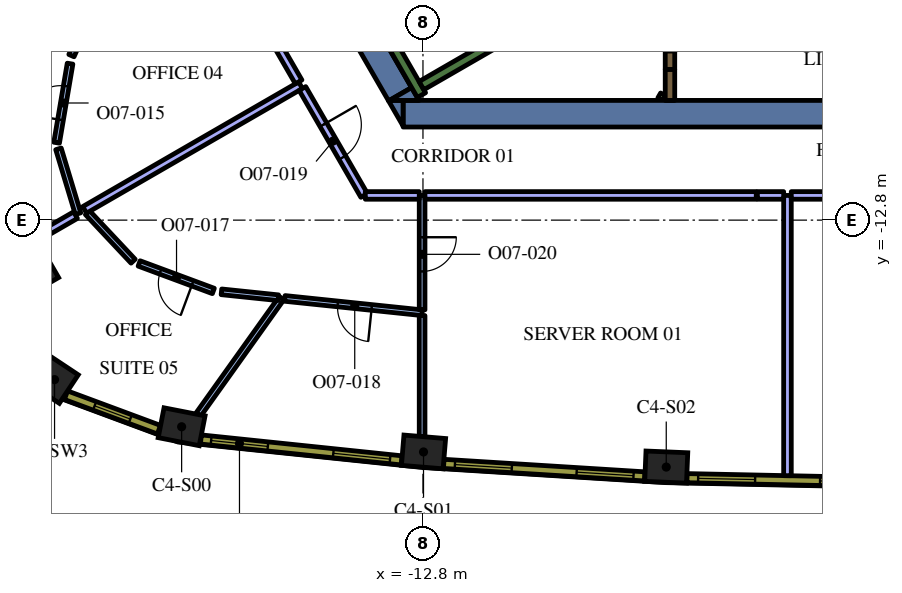
"""IFC4 building model, lengths in metres.
Left out: names, types, materials, properties, quantities, classifications, styles, units other than length and angle.
Written with IfcOpenShell. Run it as: python <this file> out.ifc"""

import sys

from ifc_helpers import new_model, si_unit, direction, frame, frame_2d, origin, origin_2d, place, context, subcontext, project, spatial, polyline, rectangle, outline, extrude, element, fill, save


model = new_model("IFC4")
c1 = context("Model", 3, precision=1e-05, world=origin(), true_north=direction((0.0, 1.0)))
c2 = subcontext(c1, "Body", "Model", "MODEL_VIEW")
j1 = project(units=[si_unit("LENGTHUNIT", "METRE"), si_unit("PLANEANGLEUNIT", "RADIAN")], contexts=[c1])
p1 = place(None, origin())
s1 = spatial("IfcSite", under=j1, at=p1, CompositionType="ELEMENT")
p2 = place(p1, origin())
s2 = spatial("IfcBuilding", under=s1, at=p2, CompositionType="ELEMENT")
p3 = place(p2, frame((0.0, 0.0, 222.6)))
s3 = spatial("IfcBuildingStorey", under=s2, at=p3, CompositionType="ELEMENT", Elevation=222.6)
p4 = place(p3, frame((-24.027, -13.872, 0.0), z_axis=(0.0, 0.0, 1.0), x_axis=(-0.866025403784, -0.5, 0.0)))
e1 = element("IfcColumn", 1, at=p4, inside=s3, PredefinedType="COLUMN", context=c2, shape_type="SweptSolid", body=[
    extrude(rectangle(XDim=2.4, YDim=2.4, at=origin_2d()), origin(), (0.0, 0.0, 1.0), 4.2),
])
for number, where, z_axis, x_axis in (
    (2, (-19.15, -18.237, 0.0), (0.0, 0.0, 1.0), (0.981, -0.192, 0.0)),
    (3, (-12.785, -18.9, 0.0), (0.0, 0.0, 1.0), (0.997, -0.083, 0.0)),
    (4, (-6.398, -19.298, 0.0), (0.0, 0.0, 1.0), (0.999, -0.041, 0.0)),
):
    element("IfcColumn", number, at=place(p3, frame(where, z_axis=z_axis, x_axis=x_axis)), inside=s3, PredefinedType="COLUMN", context=c2, shape_type="SweptSolid", body=[
        extrude(rectangle(XDim=1.1, YDim=0.8, at=origin_2d()), origin(), (0.0, 0.0, 1.0), 4.2),
    ])
p5 = place(p3, frame((-22.494, -16.997, 0.0), z_axis=(0.0, 0.0, 1.0), x_axis=(0.833238868178, -0.552913183563, 0.0)))
e5 = element("IfcColumn", 5, at=p5, inside=s3, PredefinedType="COLUMN", context=c2, shape_type="SweptSolid", body=[
    extrude(rectangle(XDim=0.9, YDim=0.9, at=origin_2d()), origin(), (0.0, 0.0, 1.0), 4.2),
])
p6 = place(p3, frame((8.904, -10.0, 0.0), z_axis=(0.0, 0.0, 1.0), x_axis=(-1.0, 0.0, 0.0)))
e6 = element("IfcWall", 6, at=p6, inside=s3, PredefinedType="SOLIDWALL", context=c2, shape_type="SweptSolid", body=[
    extrude(rectangle(XDim=22.226, YDim=0.7, at=frame_2d((11.113, 0.0))), origin(), (0.0, 0.0, 1.0), 4.2),
])
p7 = place(p3, origin())
e7 = element("IfcWall", 7, at=p7, inside=s3, PredefinedType="SOLIDWALL", context=c2, shape_type="SweptSolid", body=[
    extrude(outline(polyline([(-13.712, -9.65), (-13.324, -9.65), (-13.324, -10.322), (-13.712, -9.65)])), origin(), (0.0, 0.0, 1.0), 4.2),
])
p8 = place(p3, frame((-13.402, -9.487, 0.0), z_axis=(0.0, 0.0, 1.0), x_axis=(-0.500020498207, 0.866013568815, 0.0)))
e8 = element("IfcWall", 8, at=p8, inside=s3, PredefinedType="SOLIDWALL", context=c2, shape_type="SweptSolid", body=[
    extrude(rectangle(XDim=3.829, YDim=0.7, at=frame_2d((1.915, 0.0))), origin(), (0.0, 0.0, 1.0), 4.2),
])
e9 = element("IfcWall", 9, at=p7, inside=s3, PredefinedType="SOLIDWALL", context=c2, shape_type="SweptSolid", body=[
    extrude(outline(polyline([(-12.904, -9.65), (-13.68, -9.65), (-13.098, -9.314), (-12.904, -9.65)])), origin(), (0.0, 0.0, 1.0), 4.2),
])
p9 = place(p3, frame((-12.84, -9.511, 0.0), z_axis=(0.0, 0.0, 1.0), x_axis=(-0.499997733992, 0.866026712061, 0.0)))
e10 = element("IfcWall", 10, at=p9, inside=s3, PredefinedType="SOLIDWALL", context=c2, shape_type="SweptSolid", body=[
    extrude(rectangle(XDim=3.634, YDim=0.25, at=frame_2d((1.817, 0.0))), origin(), (0.0, 0.0, 1.0), 4.2),
])
p10 = place(p3, frame((-12.84, -9.261, 0.0), z_axis=(0.0, 0.0, 1.0), x_axis=(0.866016039709, 0.500016218704, 0.0)))
e11 = element("IfcWall", 11, at=p10, inside=s3, PredefinedType="SOLIDWALL", context=c2, shape_type="SweptSolid", body=[
    extrude(rectangle(XDim=7.05, YDim=0.25, at=frame_2d((3.525, 0.0))), origin(), (0.0, 0.0, 1.0), 4.2),
])
p11 = place(p3, frame((-6.3, -9.65, 0.0), z_axis=(0.0, 0.0, 1.0), x_axis=(0.0, 1.0, 0.0)))
e12 = element("IfcWall", 12, at=p11, inside=s3, PredefinedType="SOLIDWALL", context=c2, shape_type="SweptSolid", body=[
    extrude(rectangle(XDim=0.816, YDim=0.25, at=frame_2d((0.408, 0.0))), origin(), (0.0, 0.0, 1.0), 4.2),
])
p12 = place(p3, frame((-6.553, -9.618, 0.0), z_axis=(0.0, 0.0, 1.0), x_axis=(0.499915430684, 0.866074224396, 0.0)))
e13 = element("IfcWall", 13, at=p12, inside=s3, PredefinedType="PARTITIONING", context=c2, shape_type="SweptSolid", body=[
    extrude(rectangle(XDim=0.146, YDim=0.15, at=frame_2d((0.073, 0.0))), origin(), (0.0, 0.0, 1.0), 3.45),
])
p13 = place(p3, frame((-6.3, -7.034, 0.0), z_axis=(0.0, 0.0, 1.0), x_axis=(0.0, -1.0, 0.0)))
e14 = element("IfcWall", 14, at=p13, inside=s3, PredefinedType="SOLIDWALL", context=c2, shape_type="SweptSolid", body=[
    extrude(rectangle(XDim=1.8, YDim=0.25, at=frame_2d((0.9, 0.0))), origin(), (0.0, 0.0, 1.0), 4.2),
])
p14 = place(p13, frame((0.45, 0.0, 0.0)))
e15 = element("IfcOpeningElement", 15, at=p14, cuts=e14, PredefinedType="OPENING", context=c2, shape_type="SweptSolid", body=[
    extrude(rectangle(XDim=0.9, YDim=2.1, at=frame_2d((0.45, 1.05))), frame((0.0, 0.135, 0.0), z_axis=(0.0, -1.0, 0.0), x_axis=(1.0, 0.0, 0.0)), (0.0, 0.0, 1.0), 0.27),
])
p15 = place(p3, frame((-3.208, -19.524, 0.0), z_axis=(0.0, 0.0, 1.0), x_axis=(0.0, 1.0, 0.0)))
e16 = element("IfcWall", 16, at=p15, inside=s3, PredefinedType="PARTITIONING", context=c2, shape_type="SweptSolid", body=[
    extrude(rectangle(XDim=7.374, YDim=0.2, at=frame_2d((3.687, 0.0))), origin(), (0.0, 0.0, 1.0), 3.45),
])
p16 = place(p3, frame((-3.108, -12.15, 0.0), z_axis=(0.0, 0.0, 1.0), x_axis=(1.0, 0.0, 0.0)))
e17 = element("IfcWall", 17, at=p16, inside=s3, PredefinedType="PARTITIONING", context=c2, shape_type="SweptSolid", body=[
    extrude(rectangle(XDim=7.108, YDim=0.2, at=frame_2d((3.554, 0.0))), origin(), (0.0, 0.0, 1.0), 3.45),
])
p17 = place(p16, frame((3.1, 0.0, 0.0)))
e18 = element("IfcOpeningElement", 18, at=p17, cuts=e17, PredefinedType="OPENING", context=c2, shape_type="SweptSolid", body=[
    extrude(rectangle(XDim=1.0, YDim=2.1, at=frame_2d((0.5, 1.05))), frame((0.0, 0.11, 0.0), z_axis=(0.0, -1.0, 0.0), x_axis=(1.0, 0.0, 0.0)), (0.0, 0.0, 1.0), 0.22),
])
p18 = place(p3, frame((-21.386, -6.983, 0.0), z_axis=(0.0, 0.0, 1.0), x_axis=(-0.407597309494, -0.91316177827, 0.0)))
e19 = element("IfcWall", 19, at=p18, inside=s3, PredefinedType="PARTITIONING", context=c2, shape_type="SweptSolid", body=[
    extrude(rectangle(XDim=1.63, YDim=0.15, at=frame_2d((0.815, 0.0))), origin(), (0.0, 0.0, 1.0), 3.45),
])
p19 = place(p3, frame((-22.44, -10.763, 0.0), z_axis=(0.0, 0.0, 1.0), x_axis=(0.167682096872, 0.985841120257, 0.0)))
e20 = element("IfcWall", 20, at=p19, inside=s3, PredefinedType="PARTITIONING", context=c2, shape_type="SweptSolid", body=[
    extrude(rectangle(XDim=2.11, YDim=0.15, at=frame_2d((1.055, 0.0))), origin(), (0.0, 0.0, 1.0), 3.45),
])
p20 = place(p19, frame((0.61, 0.0, 0.0)))
e21 = element("IfcOpeningElement", 21, at=p20, cuts=e20, PredefinedType="OPENING", context=c2, shape_type="SweptSolid", body=[
    extrude(rectangle(XDim=0.9, YDim=2.1, at=frame_2d((0.45, 1.05))), frame((0.0, 0.085, 0.0), z_axis=(0.0, -1.0, 0.0), x_axis=(1.0, 0.0, 0.0)), (0.0, 0.0, 1.0), 0.17),
])
p21 = place(p3, frame((-22.391, -10.924, 0.0), z_axis=(0.0, 0.0, 1.0), x_axis=(0.288642134652, -0.957437056993, 0.0)))
e22 = element("IfcWall", 22, at=p21, inside=s3, PredefinedType="PARTITIONING", context=c2, shape_type="SweptSolid", body=[
    extrude(rectangle(XDim=1.782, YDim=0.15, at=frame_2d((0.891, 0.0))), origin(), (0.0, 0.0, 1.0), 3.45),
])
p22 = place(p3, frame((-21.943, -12.669, 0.0), z_axis=(0.0, 0.0, 1.0), x_axis=(-0.866030586491, -0.499991023182, 0.0)))
e23 = element("IfcWall", 23, at=p22, inside=s3, PredefinedType="PARTITIONING", context=c2, shape_type="SweptSolid", body=[
    extrude(rectangle(XDim=1.207, YDim=0.2, at=frame_2d((0.603, 0.0))), origin(), (0.0, 0.0, 1.0), 3.45),
])
p23 = place(p3, frame((-16.021, -9.25, 0.0), z_axis=(0.0, 0.0, 1.0), x_axis=(-0.866021955858, -0.500005971936, 0.0)))
e24 = element("IfcWall", 24, at=p23, inside=s3, PredefinedType="PARTITIONING", context=c2, shape_type="SweptSolid", body=[
    extrude(rectangle(XDim=6.56, YDim=0.2, at=frame_2d((3.28, 0.0))), origin(), (0.0, 0.0, 1.0), 3.45),
])
p24 = place(p3, frame((-17.681, -6.376, 0.0), z_axis=(0.0, 0.0, 1.0), x_axis=(0.500022299258, -0.866012528919, 0.0)))
e25 = element("IfcWall", 25, at=p24, inside=s3, PredefinedType="PARTITIONING", context=c2, shape_type="SweptSolid", body=[
    extrude(rectangle(XDim=3.219, YDim=0.2, at=frame_2d((1.609, 0.0))), origin(), (0.0, 0.0, 1.0), 3.45),
])
p25 = place(p3, frame((-16.521, -14.851, 0.0), z_axis=(0.0, 0.0, 1.0), x_axis=(-0.58104805465, -0.813869251285, 0.0)))
e26 = element("IfcWall", 26, at=p25, inside=s3, PredefinedType="PARTITIONING", context=c2, shape_type="SweptSolid", body=[
    extrude(rectangle(XDim=3.766, YDim=0.15, at=frame_2d((1.883, 0.0))), origin(), (0.0, 0.0, 1.0), 3.45),
])
p26 = place(p3, frame((-21.628, -12.603, 0.0), z_axis=(0.0, 0.0, 1.0), x_axis=(0.684778496912, -0.728751267695, 0.0)))
e27 = element("IfcWall", 27, at=p26, inside=s3, PredefinedType="PARTITIONING", context=c2, shape_type="SweptSolid", body=[
    extrude(rectangle(XDim=1.754, YDim=0.15, at=frame_2d((0.877, 0.0))), origin(), (0.0, 0.0, 1.0), 3.45),
])
p27 = place(p3, frame((-18.316, -14.664, 0.0), z_axis=(0.0, 0.0, 1.0), x_axis=(-0.937594570401, 0.347730386297, 0.0)))
e28 = element("IfcWall", 28, at=p27, inside=s3, PredefinedType="PARTITIONING", context=c2, shape_type="SweptSolid", body=[
    extrude(rectangle(XDim=2.083, YDim=0.15, at=frame_2d((1.042, 0.0))), origin(), (0.0, 0.0, 1.0), 3.45),
])
p28 = place(p27, frame((0.583, 0.0, 0.0)))
e29 = element("IfcOpeningElement", 29, at=p28, cuts=e28, PredefinedType="OPENING", context=c2, shape_type="SweptSolid", body=[
    extrude(rectangle(XDim=0.9, YDim=2.1, at=frame_2d((0.45, 1.05))), frame((0.0, 0.085, 0.0), z_axis=(0.0, -1.0, 0.0), x_axis=(1.0, 0.0, 0.0)), (0.0, 0.0, 1.0), 0.17),
])
p29 = place(p3, frame((-18.103, -14.686, 0.0), z_axis=(0.0, 0.0, 1.0), x_axis=(0.994622241781, -0.103569281909, 0.0)))
e30 = element("IfcWall", 30, at=p29, inside=s3, PredefinedType="PARTITIONING", context=c2, shape_type="SweptSolid", body=[
    extrude(rectangle(XDim=1.504, YDim=0.15, at=frame_2d((0.752, 0.0))), origin(), (0.0, 0.0, 1.0), 3.45),
])
p30 = place(p3, frame((-12.823, -15.236, 0.0), z_axis=(0.0, 0.0, 1.0), x_axis=(-0.994621582944, 0.10357560882, 0.0)))
e31 = element("IfcWall", 31, at=p30, inside=s3, PredefinedType="PARTITIONING", context=c2, shape_type="SweptSolid", body=[
    extrude(rectangle(XDim=3.632, YDim=0.15, at=frame_2d((1.816, 0.0))), origin(), (0.0, 0.0, 1.0), 3.45),
])
p31 = place(p30, frame((1.332, 0.0, 0.0)))
e32 = element("IfcOpeningElement", 32, at=p31, cuts=e31, PredefinedType="OPENING", context=c2, shape_type="SweptSolid", body=[
    extrude(rectangle(XDim=0.9, YDim=2.1, at=frame_2d((0.45, 1.05))), frame((0.0, 0.085, 0.0), z_axis=(0.0, -1.0, 0.0), x_axis=(1.0, 0.0, 0.0)), (0.0, 0.0, 1.0), 0.17),
])
p32 = place(p3, frame((-12.823, -15.312, 0.0), z_axis=(0.0, 0.0, 1.0), x_axis=(0.0, -1.0, 0.0)))
e33 = element("IfcWall", 33, at=p32, inside=s3, PredefinedType="PARTITIONING", context=c2, shape_type="SweptSolid", body=[
    extrude(rectangle(XDim=3.184, YDim=0.15, at=frame_2d((1.592, 0.0))), origin(), (0.0, 0.0, 1.0), 3.45),
])
p33 = place(p3, frame((-12.823, -12.15, 0.0), z_axis=(0.0, 0.0, 1.0), x_axis=(0.0, -1.0, 0.0)))
e34 = element("IfcWall", 34, at=p33, inside=s3, PredefinedType="PARTITIONING", context=c2, shape_type="SweptSolid", body=[
    extrude(rectangle(XDim=3.011, YDim=0.15, at=frame_2d((1.505, 0.0))), origin(), (0.0, 0.0, 1.0), 3.45),
])
p34 = place(p33, frame((1.1, 0.0, 0.0)))
e35 = element("IfcOpeningElement", 35, at=p34, cuts=e34, PredefinedType="OPENING", context=c2, shape_type="SweptSolid", body=[
    extrude(rectangle(XDim=0.9, YDim=2.1, at=frame_2d((0.45, 1.05))), frame((0.0, 0.085, 0.0), z_axis=(0.0, -1.0, 0.0), x_axis=(1.0, 0.0, 0.0)), (0.0, 0.0, 1.0), 0.17),
])
p35 = place(p3, frame((-15.971, -9.337, 0.0), z_axis=(0.0, 0.0, 1.0), x_axis=(0.500010870188, -0.866019127788, 0.0)))
e36 = element("IfcWall", 36, at=p35, inside=s3, PredefinedType="PARTITIONING", context=c2, shape_type="SweptSolid", body=[
    extrude(rectangle(XDim=3.249, YDim=0.2, at=frame_2d((1.624, 0.0))), origin(), (0.0, 0.0, 1.0), 3.45),
])
p36 = place(p35, frame((1.1, 0.0, 0.0)))
e37 = element("IfcOpeningElement", 37, at=p36, cuts=e36, PredefinedType="OPENING", context=c2, shape_type="SweptSolid", body=[
    extrude(rectangle(XDim=1.0, YDim=2.1, at=frame_2d((0.5, 1.05))), frame((0.0, 0.11, 0.0), z_axis=(0.0, -1.0, 0.0), x_axis=(1.0, 0.0, 0.0)), (0.0, 0.0, 1.0), 0.22),
])
p37 = place(p3, frame((-14.317, -12.15, 0.0), z_axis=(0.0, 0.0, 1.0), x_axis=(1.0, 0.0, 0.0)))
e38 = element("IfcWall", 38, at=p37, inside=s3, PredefinedType="PARTITIONING", context=c2, shape_type="SweptSolid", body=[
    extrude(rectangle(XDim=1.419, YDim=0.2, at=frame_2d((0.71, 0.0))), origin(), (0.0, 0.0, 1.0), 3.45),
])
p38 = place(p3, frame((-4.0, -12.15, 0.0), z_axis=(0.0, 0.0, 1.0), x_axis=(1.0, 0.0, 0.0)))
e39 = element("IfcWall", 39, at=p38, inside=s3, PredefinedType="PARTITIONING", context=c2, shape_type="SweptSolid", body=[
    extrude(rectangle(XDim=0.692, YDim=0.2, at=frame_2d((0.346, 0.0))), origin(), (0.0, 0.0, 1.0), 3.45),
])
p39 = place(p3, frame((-12.748, -12.15, 0.0), z_axis=(0.0, 0.0, 1.0), x_axis=(1.0, 0.0, 0.0)))
e40 = element("IfcWall", 40, at=p39, inside=s3, PredefinedType="PARTITIONING", context=c2, shape_type="SweptSolid", body=[
    extrude(rectangle(XDim=8.718, YDim=0.2, at=frame_2d((4.359, 0.0))), origin(), (0.0, 0.0, 1.0), 3.45),
])
p40 = place(p3, frame((-18.644, -18.571, 0.0), z_axis=(0.0, 0.0, 1.0), x_axis=(0.994621961215, -0.103571976272, 0.0)))
e41 = element("IfcWall", 41, at=p40, inside=s3, PredefinedType="SOLIDWALL", context=c2, shape_type="SweptSolid", body=[
    extrude(rectangle(XDim=5.311, YDim=0.24, at=frame_2d((2.655, 0.0))), origin(), (0.0, 0.0, 1.0), 3.95),
])
p41 = place(p40, frame((0.271, 0.0, 0.9)))
e42 = element("IfcOpeningElement", 42, at=p41, cuts=e41, PredefinedType="OPENING", context=c2, shape_type="SweptSolid", body=[
    extrude(rectangle(XDim=1.5, YDim=2.55, at=frame_2d((0.75, 1.275))), frame((0.0, 0.13, 0.0), z_axis=(0.0, -1.0, 0.0), x_axis=(1.0, 0.0, 0.0)), (0.0, 0.0, 1.0), 0.26),
])
p42 = place(p40, frame((3.504, 0.0, 0.9)))
e43 = element("IfcOpeningElement", 43, at=p42, cuts=e41, PredefinedType="OPENING", context=c2, shape_type="SweptSolid", body=[
    extrude(rectangle(XDim=1.5, YDim=2.55, at=frame_2d((0.75, 1.275))), frame((0.0, 0.13, 0.0), z_axis=(0.0, -1.0, 0.0), x_axis=(1.0, 0.0, 0.0)), (0.0, 0.0, 1.0), 0.26),
])
p43 = place(p3, frame((-12.253, -19.213, 0.0), z_axis=(0.0, 0.0, 1.0), x_axis=(0.9980633213, -0.062206162685, 0.0)))
e44 = element("IfcWall", 44, at=p43, inside=s3, PredefinedType="SOLIDWALL", context=c2, shape_type="SweptSolid", body=[
    extrude(rectangle(XDim=5.298, YDim=0.24, at=frame_2d((2.649, 0.0))), origin(), (0.0, 0.0, 1.0), 3.95),
])
p44 = place(p43, frame((0.294, 0.0, 0.9)))
e45 = element("IfcOpeningElement", 45, at=p44, cuts=e44, PredefinedType="OPENING", context=c2, shape_type="SweptSolid", body=[
    extrude(rectangle(XDim=1.5, YDim=2.55, at=frame_2d((0.75, 1.275))), frame((0.0, 0.13, 0.0), z_axis=(0.0, -1.0, 0.0), x_axis=(1.0, 0.0, 0.0)), (0.0, 0.0, 1.0), 0.26),
])
p45 = place(p43, frame((3.504, 0.0, 0.9)))
e46 = element("IfcOpeningElement", 46, at=p45, cuts=e44, PredefinedType="OPENING", context=c2, shape_type="SweptSolid", body=[
    extrude(rectangle(XDim=1.5, YDim=2.55, at=frame_2d((0.75, 1.275))), frame((0.0, 0.13, 0.0), z_axis=(0.0, -1.0, 0.0), x_axis=(1.0, 0.0, 0.0)), (0.0, 0.0, 1.0), 0.26),
])
p46 = place(p3, frame((-5.854, -19.589, 0.0), z_axis=(0.0, 0.0, 1.0), x_axis=(0.999784035184, -0.020781794712, 0.0)))
e47 = element("IfcWall", 47, at=p46, inside=s3, PredefinedType="SOLIDWALL", context=c2, shape_type="SweptSolid", body=[
    extrude(rectangle(XDim=5.298, YDim=0.24, at=frame_2d((2.649, 0.0))), origin(), (0.0, 0.0, 1.0), 3.95),
])
p47 = place(p46, frame((0.294, 0.0, 0.9)))
e48 = element("IfcOpeningElement", 48, at=p47, cuts=e47, PredefinedType="OPENING", context=c2, shape_type="SweptSolid", body=[
    extrude(rectangle(XDim=1.5, YDim=2.55, at=frame_2d((0.75, 1.275))), frame((0.0, 0.13, 0.0), z_axis=(0.0, -1.0, 0.0), x_axis=(1.0, 0.0, 0.0)), (0.0, 0.0, 1.0), 0.26),
])
p48 = place(p46, frame((3.504, 0.0, 0.9)))
e49 = element("IfcOpeningElement", 49, at=p48, cuts=e47, PredefinedType="OPENING", context=c2, shape_type="SweptSolid", body=[
    extrude(rectangle(XDim=1.5, YDim=2.55, at=frame_2d((0.75, 1.275))), frame((0.0, 0.13, 0.0), z_axis=(0.0, -1.0, 0.0), x_axis=(1.0, 0.0, 0.0)), (0.0, 0.0, 1.0), 0.26),
])
p49 = place(p3, frame((-22.194, -17.406, 0.0), z_axis=(0.0, 0.0, 1.0), x_axis=(0.937569171184, -0.347798863203, 0.0)))
e50 = element("IfcWall", 50, at=p49, inside=s3, PredefinedType="SOLIDWALL", context=c2, shape_type="SweptSolid", body=[
    extrude(rectangle(XDim=2.609, YDim=0.24, at=frame_2d((1.305, 0.0))), origin(), (0.0, 0.0, 1.0), 3.95),
])
p50 = place(p49, frame((0.805, 0.0, 0.9)))
e51 = element("IfcOpeningElement", 51, at=p50, cuts=e50, PredefinedType="OPENING", context=c2, shape_type="SweptSolid", body=[
    extrude(rectangle(XDim=1.0, YDim=2.55, at=frame_2d((0.5, 1.275))), frame((0.0, 0.13, 0.0), z_axis=(0.0, -1.0, 0.0), x_axis=(1.0, 0.0, 0.0)), (0.0, 0.0, 1.0), 0.26),
])
p51 = place(p20, origin())
e52 = element("IfcDoor", 52, at=p51, inside=s3, OperationType="SINGLE_SWING_RIGHT", PredefinedType="DOOR", context=c2, shape_type="SweptSolid", body=[
    extrude(rectangle(XDim=0.9, YDim=2.1, at=frame_2d((0.45, 1.05))), frame((0.0, 0.025, 0.0), z_axis=(0.0, -1.0, 0.0), x_axis=(1.0, 0.0, 0.0)), (0.0, 0.0, 1.0), 0.05),
])
fill(e21, e52)
p52 = place(p28, origin())
e53 = element("IfcDoor", 53, at=p52, inside=s3, OperationType="SINGLE_SWING_LEFT", PredefinedType="DOOR", context=c2, shape_type="SweptSolid", body=[
    extrude(rectangle(XDim=0.9, YDim=2.1, at=frame_2d((0.45, 1.05))), frame((0.0, 0.025, 0.0), z_axis=(0.0, -1.0, 0.0), x_axis=(1.0, 0.0, 0.0)), (0.0, 0.0, 1.0), 0.05),
])
fill(e29, e53)
p53 = place(p31, origin())
e54 = element("IfcDoor", 54, at=p53, inside=s3, OperationType="SINGLE_SWING_LEFT", PredefinedType="DOOR", context=c2, shape_type="SweptSolid", body=[
    extrude(rectangle(XDim=0.9, YDim=2.1, at=frame_2d((0.45, 1.05))), frame((0.0, 0.025, 0.0), z_axis=(0.0, -1.0, 0.0), x_axis=(1.0, 0.0, 0.0)), (0.0, 0.0, 1.0), 0.05),
])
fill(e32, e54)
p54 = place(p36, origin())
e55 = element("IfcDoor", 55, at=p54, inside=s3, OperationType="SINGLE_SWING_LEFT", PredefinedType="DOOR", context=c2, shape_type="SweptSolid", body=[
    extrude(rectangle(XDim=1.0, YDim=2.1, at=frame_2d((0.5, 1.05))), frame((0.0, 0.025, 0.0), z_axis=(0.0, -1.0, 0.0), x_axis=(1.0, 0.0, 0.0)), (0.0, 0.0, 1.0), 0.05),
])
fill(e37, e55)
p55 = place(p34, origin())
e56 = element("IfcDoor", 56, at=p55, inside=s3, OperationType="SINGLE_SWING_RIGHT", PredefinedType="DOOR", context=c2, shape_type="SweptSolid", body=[
    extrude(rectangle(XDim=0.9, YDim=2.1, at=frame_2d((0.45, 1.05))), frame((0.0, 0.025, 0.0), z_axis=(0.0, -1.0, 0.0), x_axis=(1.0, 0.0, 0.0)), (0.0, 0.0, 1.0), 0.05),
])
fill(e35, e56)
p56 = place(p41, origin())
e57 = element("IfcWindow", 57, at=p56, inside=s3, PartitioningType="SINGLE_PANEL", PredefinedType="WINDOW", context=c2, shape_type="SweptSolid", body=[
    extrude(rectangle(XDim=1.5, YDim=2.55, at=frame_2d((0.75, 1.275))), frame((0.0, 0.04, 0.0), z_axis=(0.0, -1.0, 0.0), x_axis=(1.0, 0.0, 0.0)), (0.0, 0.0, 1.0), 0.06),
])
fill(e42, e57)
p57 = place(p42, origin())
e58 = element("IfcWindow", 58, at=p57, inside=s3, PartitioningType="SINGLE_PANEL", PredefinedType="WINDOW", context=c2, shape_type="SweptSolid", body=[
    extrude(rectangle(XDim=1.5, YDim=2.55, at=frame_2d((0.75, 1.275))), frame((0.0, 0.04, 0.0), z_axis=(0.0, -1.0, 0.0), x_axis=(1.0, 0.0, 0.0)), (0.0, 0.0, 1.0), 0.06),
])
fill(e43, e58)
p58 = place(p44, origin())
e59 = element("IfcWindow", 59, at=p58, inside=s3, PartitioningType="SINGLE_PANEL", PredefinedType="WINDOW", context=c2, shape_type="SweptSolid", body=[
    extrude(rectangle(XDim=1.5, YDim=2.55, at=frame_2d((0.75, 1.275))), frame((0.0, 0.04, 0.0), z_axis=(0.0, -1.0, 0.0), x_axis=(1.0, 0.0, 0.0)), (0.0, 0.0, 1.0), 0.06),
])
fill(e45, e59)
p59 = place(p45, origin())
e60 = element("IfcWindow", 60, at=p59, inside=s3, PartitioningType="SINGLE_PANEL", PredefinedType="WINDOW", context=c2, shape_type="SweptSolid", body=[
    extrude(rectangle(XDim=1.5, YDim=2.55, at=frame_2d((0.75, 1.275))), frame((0.0, 0.04, 0.0), z_axis=(0.0, -1.0, 0.0), x_axis=(1.0, 0.0, 0.0)), (0.0, 0.0, 1.0), 0.06),
])
fill(e46, e60)
p60 = place(p47, origin())
e61 = element("IfcWindow", 61, at=p60, inside=s3, PartitioningType="SINGLE_PANEL", PredefinedType="WINDOW", context=c2, shape_type="SweptSolid", body=[
    extrude(rectangle(XDim=1.5, YDim=2.55, at=frame_2d((0.75, 1.275))), frame((0.0, 0.04, 0.0), z_axis=(0.0, -1.0, 0.0), x_axis=(1.0, 0.0, 0.0)), (0.0, 0.0, 1.0), 0.06),
])
fill(e48, e61)
p61 = place(p48, origin())
e62 = element("IfcWindow", 62, at=p61, inside=s3, PartitioningType="SINGLE_PANEL", PredefinedType="WINDOW", context=c2, shape_type="SweptSolid", body=[
    extrude(rectangle(XDim=1.5, YDim=2.55, at=frame_2d((0.75, 1.275))), frame((0.0, 0.04, 0.0), z_axis=(0.0, -1.0, 0.0), x_axis=(1.0, 0.0, 0.0)), (0.0, 0.0, 1.0), 0.06),
])
fill(e49, e62)
p62 = place(p50, origin())
e63 = element("IfcWindow", 63, at=p62, inside=s3, PartitioningType="SINGLE_PANEL", PredefinedType="WINDOW", context=c2, shape_type="SweptSolid", body=[
    extrude(rectangle(XDim=1.0, YDim=2.55, at=frame_2d((0.5, 1.275))), frame((0.0, 0.04, 0.0), z_axis=(0.0, -1.0, 0.0), x_axis=(1.0, 0.0, 0.0)), (0.0, 0.0, 1.0), 0.06),
])
fill(e51, e63)
save(model, sys.argv[1])
